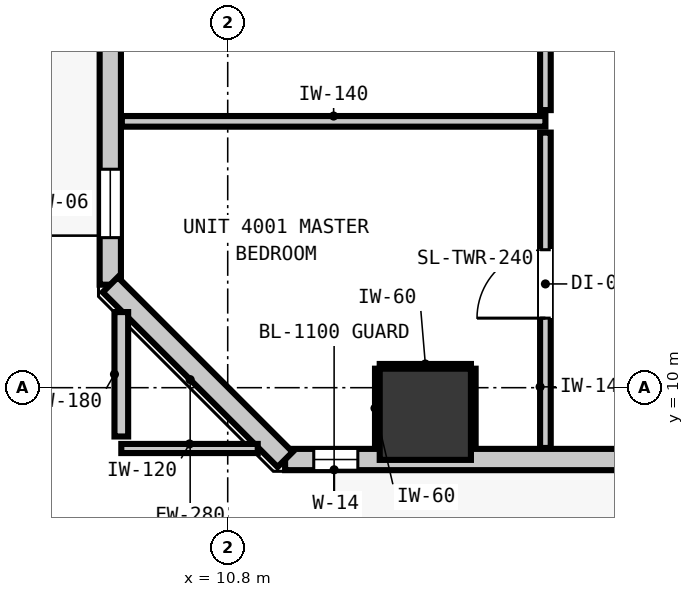
"""IFC4 building model, lengths in metres.
Left out: names, types, materials, properties, quantities, classifications, styles, units other than length and angle.
Written with IfcOpenShell. Run it as: python <this file> out.ifc"""

import sys

from ifc_helpers import new_model, si_unit, direction, frame, frame_2d, origin, origin_2d, place, context, subcontext, project, spatial, rectangle, extrude, element, fill, save


model = new_model("IFC4")
c1 = context("Model", 3, precision=1e-05, world=origin(), true_north=direction((0.0, 1.0)))
c2 = subcontext(c1, "Body", "Model", "MODEL_VIEW")
j1 = project(units=[si_unit("LENGTHUNIT", "METRE"), si_unit("PLANEANGLEUNIT", "RADIAN")], contexts=[c1])
p1 = place(None, origin())
s1 = spatial("IfcSite", under=j1, at=p1, CompositionType="ELEMENT")
p2 = place(p1, origin())
s2 = spatial("IfcBuilding", under=s1, at=p2, CompositionType="ELEMENT")
p3 = place(p2, frame((0.0, 0.0, 139.28)))
s3 = spatial("IfcBuildingStorey", under=s2, at=p3, CompositionType="ELEMENT", Elevation=139.28)
p4 = place(p3, frame((13.4, 9.65, 0.0), z_axis=(0.0, 0.0, 1.0), x_axis=(1.0, 0.0, 0.0)))
e1 = element("IfcColumn", 1, at=p4, inside=s3, PredefinedType="COLUMN", context=c2, shape_type="SweptSolid", body=[
    extrude(rectangle(XDim=1.2, YDim=1.2, at=origin_2d()), origin(), (0.0, 0.0, 1.0), 3.32),
])
p5 = place(p3, frame((9.255, 11.355, 0.0), z_axis=(0.0, 0.0, 1.0), x_axis=(0.0, 1.0, 0.0)))
e2 = element("IfcWall", 2, at=p5, inside=s3, PredefinedType="STANDARD", context=c2, shape_type="SweptSolid", body=[
    extrude(rectangle(XDim=32.29, YDim=0.28, at=frame_2d((16.145, 0.0))), origin(), (0.0, 0.0, 1.0), 3.08),
])
p6 = place(p5, frame((5.818, 0.0, 0.0)))
e3 = element("IfcOpeningElement", 3, at=p6, cuts=e2, PredefinedType="OPENING", context=c2, shape_type="SweptSolid", body=[
    extrude(rectangle(XDim=1.0, YDim=2.15, at=frame_2d((0.5, 1.075))), frame((0.0, 0.15, 0.0), z_axis=(0.0, -1.0, 0.0), x_axis=(1.0, 0.0, 0.0)), (0.0, 0.0, 1.0), 0.3),
])
p7 = place(p5, frame((0.619, 0.0, 0.85)))
e4 = element("IfcOpeningElement", 4, at=p7, cuts=e2, PredefinedType="OPENING", context=c2, shape_type="SweptSolid", body=[
    extrude(rectangle(XDim=0.9, YDim=1.5, at=frame_2d((0.45, 0.75))), frame((0.0, 0.15, 0.0), z_axis=(0.0, -1.0, 0.0), x_axis=(1.0, 0.0, 0.0)), (0.0, 0.0, 1.0), 0.3),
])
p8 = place(p3, frame((46.645, 9.055, 0.0), z_axis=(0.0, 0.0, 1.0), x_axis=(-1.0, 0.0, 0.0)))
e5 = element("IfcWall", 5, at=p8, inside=s3, PredefinedType="STANDARD", context=c2, shape_type="SweptSolid", body=[
    extrude(rectangle(XDim=35.09, YDim=0.28, at=frame_2d((17.545, 0.0))), origin(), (0.0, 0.0, 1.0), 3.08),
])
p9 = place(p8, frame((0.904, 0.0, 0.0)))
e6 = element("IfcOpeningElement", 6, at=p9, cuts=e5, PredefinedType="OPENING", context=c2, shape_type="SweptSolid", body=[
    extrude(rectangle(XDim=1.0, YDim=2.15, at=frame_2d((0.5, 1.075))), frame((0.0, 0.15, 0.0), z_axis=(0.0, -1.0, 0.0), x_axis=(1.0, 0.0, 0.0)), (0.0, 0.0, 1.0), 0.3),
])
p10 = place(p8, frame((28.555, 0.0, 0.85)))
e7 = element("IfcOpeningElement", 7, at=p10, cuts=e5, PredefinedType="OPENING", context=c2, shape_type="SweptSolid", body=[
    extrude(rectangle(XDim=0.9, YDim=1.5, at=frame_2d((0.45, 0.75))), frame((0.0, 0.15, 0.0), z_axis=(0.0, -1.0, 0.0), x_axis=(1.0, 0.0, 0.0)), (0.0, 0.0, 1.0), 0.3),
])
p11 = place(p8, frame((34.133, 0.0, 0.85)))
e8 = element("IfcOpeningElement", 8, at=p11, cuts=e5, PredefinedType="OPENING", context=c2, shape_type="SweptSolid", body=[
    extrude(rectangle(XDim=0.58, YDim=1.5, at=frame_2d((0.29, 0.75))), frame((0.0, 0.15, 0.0), z_axis=(0.0, -1.0, 0.0), x_axis=(1.0, 0.0, 0.0)), (0.0, 0.0, 1.0), 0.3),
])
p12 = place(p8, frame((21.464, 0.0, 0.85)))
e9 = element("IfcOpeningElement", 9, at=p12, cuts=e5, PredefinedType="OPENING", context=c2, shape_type="SweptSolid", body=[
    extrude(rectangle(XDim=0.9, YDim=1.5, at=frame_2d((0.45, 0.75))), frame((0.0, 0.15, 0.0), z_axis=(0.0, -1.0, 0.0), x_axis=(1.0, 0.0, 0.0)), (0.0, 0.0, 1.0), 0.3),
])
p13 = place(p8, frame((5.374, 0.0, 0.85)))
e10 = element("IfcOpeningElement", 10, at=p13, cuts=e5, PredefinedType="OPENING", context=c2, shape_type="SweptSolid", body=[
    extrude(rectangle(XDim=0.9, YDim=1.5, at=frame_2d((0.45, 0.75))), frame((0.0, 0.15, 0.0), z_axis=(0.0, -1.0, 0.0), x_axis=(1.0, 0.0, 0.0)), (0.0, 0.0, 1.0), 0.3),
])
p14 = place(p3, frame((11.555, 9.055, 0.0), z_axis=(0.0, 0.0, 1.0), x_axis=(-0.707106781187, 0.707106781187, 0.0)))
e11 = element("IfcWall", 11, at=p14, inside=s3, PredefinedType="STANDARD", context=c2, shape_type="SweptSolid", body=[
    extrude(rectangle(XDim=3.253, YDim=0.28, at=frame_2d((1.626, 0.0))), origin(), (0.0, 0.0, 1.0), 3.08),
])
p15 = place(p3, frame((9.407, 13.504, 0.0), z_axis=(0.0, 0.0, 1.0), x_axis=(1.0, 0.0, 0.0)))
e12 = element("IfcWall", 12, at=p15, inside=s3, PredefinedType="PARTITIONING", context=c2, shape_type="SweptSolid", body=[
    extrude(rectangle(XDim=5.573, YDim=0.14, at=frame_2d((2.787, 0.0))), origin(), (0.0, 0.0, 1.0), 3.08),
])
p16 = place(p3, frame((9.4, 9.2, 0.0), z_axis=(0.0, 0.0, 1.0), x_axis=(1.0, 0.0, 0.0)))
e13 = element("IfcWall", 13, at=p16, inside=s3, PredefinedType="PARTITIONING", context=c2, shape_type="SweptSolid", body=[
    extrude(rectangle(XDim=1.795, YDim=0.12, at=frame_2d((0.897, 0.0))), origin(), (0.0, 0.0, 1.0), 3.08),
])
p17 = place(p3, frame((9.4, 9.358, 0.0), z_axis=(0.0, 0.0, 1.0), x_axis=(0.0, 1.0, 0.0)))
e14 = element("IfcWall", 14, at=p17, inside=s3, PredefinedType="PARTITIONING", context=c2, shape_type="SweptSolid", body=[
    extrude(rectangle(XDim=1.637, YDim=0.18, at=frame_2d((0.819, 0.0))), origin(), (0.0, 0.0, 1.0), 3.08),
])
p18 = place(p3, frame((14.98, 9.207, 0.0), z_axis=(0.0, 0.0, 1.0), x_axis=(0.0, 1.0, 0.0)))
e15 = element("IfcWall", 15, at=p18, inside=s3, PredefinedType="PARTITIONING", context=c2, shape_type="SweptSolid", body=[
    extrude(rectangle(XDim=4.149, YDim=0.14, at=frame_2d((2.074, 0.0))), origin(), (0.0, 0.0, 1.0), 3.08),
])
p19 = place(p18, frame((1.708, 0.0, 0.0)))
e16 = element("IfcOpeningElement", 16, at=p19, cuts=e15, PredefinedType="OPENING", context=c2, shape_type="SweptSolid", body=[
    extrude(rectangle(XDim=0.9, YDim=2.1, at=frame_2d((0.45, 1.05))), frame((0.0, 0.08, 0.0), z_axis=(0.0, -1.0, 0.0), x_axis=(1.0, 0.0, 0.0)), (0.0, 0.0, 1.0), 0.16),
])
p20 = place(p3, frame((14.98, 13.652, 0.0), z_axis=(0.0, 0.0, 1.0), x_axis=(0.0, 1.0, 0.0)))
e17 = element("IfcWall", 17, at=p20, inside=s3, PredefinedType="PARTITIONING", context=c2, shape_type="SweptSolid", body=[
    extrude(rectangle(XDim=2.93, YDim=0.14, at=frame_2d((1.465, 0.0))), origin(), (0.0, 0.0, 1.0), 3.08),
])
p21 = place(p20, frame((1.032, 0.0, 0.0)))
e18 = element("IfcOpeningElement", 18, at=p21, cuts=e17, PredefinedType="OPENING", context=c2, shape_type="SweptSolid", body=[
    extrude(rectangle(XDim=0.86, YDim=2.02, at=frame_2d((0.43, 1.01))), frame((0.0, 0.08, 0.0), z_axis=(0.0, -1.0, 0.0), x_axis=(1.0, 0.0, 0.0)), (0.0, 0.0, 1.0), 0.16),
])
p22 = place(p3, frame((12.8, 10.282, 0.0), z_axis=(0.0, 0.0, 1.0), x_axis=(1.0, 0.0, 0.0)))
e19 = element("IfcWall", 19, at=p22, inside=s3, PredefinedType="PARTITIONING", context=c2, shape_type="SweptSolid", body=[
    extrude(rectangle(XDim=1.2, YDim=0.06, at=frame_2d((0.6, 0.0))), origin(), (0.0, 0.0, 1.0), 1.45),
])
for number, where, z_axis, x_axis in (
    (20, (12.768, 9.21, 0.0), (0.0, 0.0, 1.0), (0.0, 1.0, 0.0)),
    (21, (14.032, 9.21, 0.0), (0.0, 0.0, 1.0), (0.0, 1.0, 0.0)),
):
    element("IfcWall", number, at=place(p3, frame(where, z_axis=z_axis, x_axis=x_axis)), inside=s3, PredefinedType="PARTITIONING", context=c2, shape_type="SweptSolid", body=[
        extrude(rectangle(XDim=1.04, YDim=0.06, at=frame_2d((0.52, 0.0))), origin(), (0.0, 0.0, 1.0), 1.45),
    ])
p23 = place(p7, origin())
e22 = element("IfcWindow", 22, at=p23, inside=s3, PartitioningType="SINGLE_PANEL", PredefinedType="WINDOW", context=c2, shape_type="SweptSolid", body=[
    extrude(rectangle(XDim=0.9, YDim=1.5, at=frame_2d((0.45, 0.75))), frame((0.0, 0.03, 0.0), z_axis=(0.0, -1.0, 0.0), x_axis=(1.0, 0.0, 0.0)), (0.0, 0.0, 1.0), 0.06),
])
fill(e4, e22)
p24 = place(p11, origin())
e23 = element("IfcWindow", 23, at=p24, inside=s3, PartitioningType="SINGLE_PANEL", PredefinedType="WINDOW", context=c2, shape_type="SweptSolid", body=[
    extrude(rectangle(XDim=0.58, YDim=1.5, at=frame_2d((0.29, 0.75))), frame((0.0, 0.03, 0.0), z_axis=(0.0, -1.0, 0.0), x_axis=(1.0, 0.0, 0.0)), (0.0, 0.0, 1.0), 0.06),
])
fill(e8, e23)
p25 = place(p19, origin())
e24 = element("IfcDoor", 24, at=p25, inside=s3, OperationType="SINGLE_SWING_LEFT", PredefinedType="DOOR", context=c2, shape_type="SweptSolid", body=[
    extrude(rectangle(XDim=0.9, YDim=2.1, at=frame_2d((0.45, 1.05))), frame((0.0, 0.025, 0.0), z_axis=(0.0, -1.0, 0.0), x_axis=(1.0, 0.0, 0.0)), (0.0, 0.0, 1.0), 0.05),
])
fill(e16, e24)
save(model, sys.argv[1])
